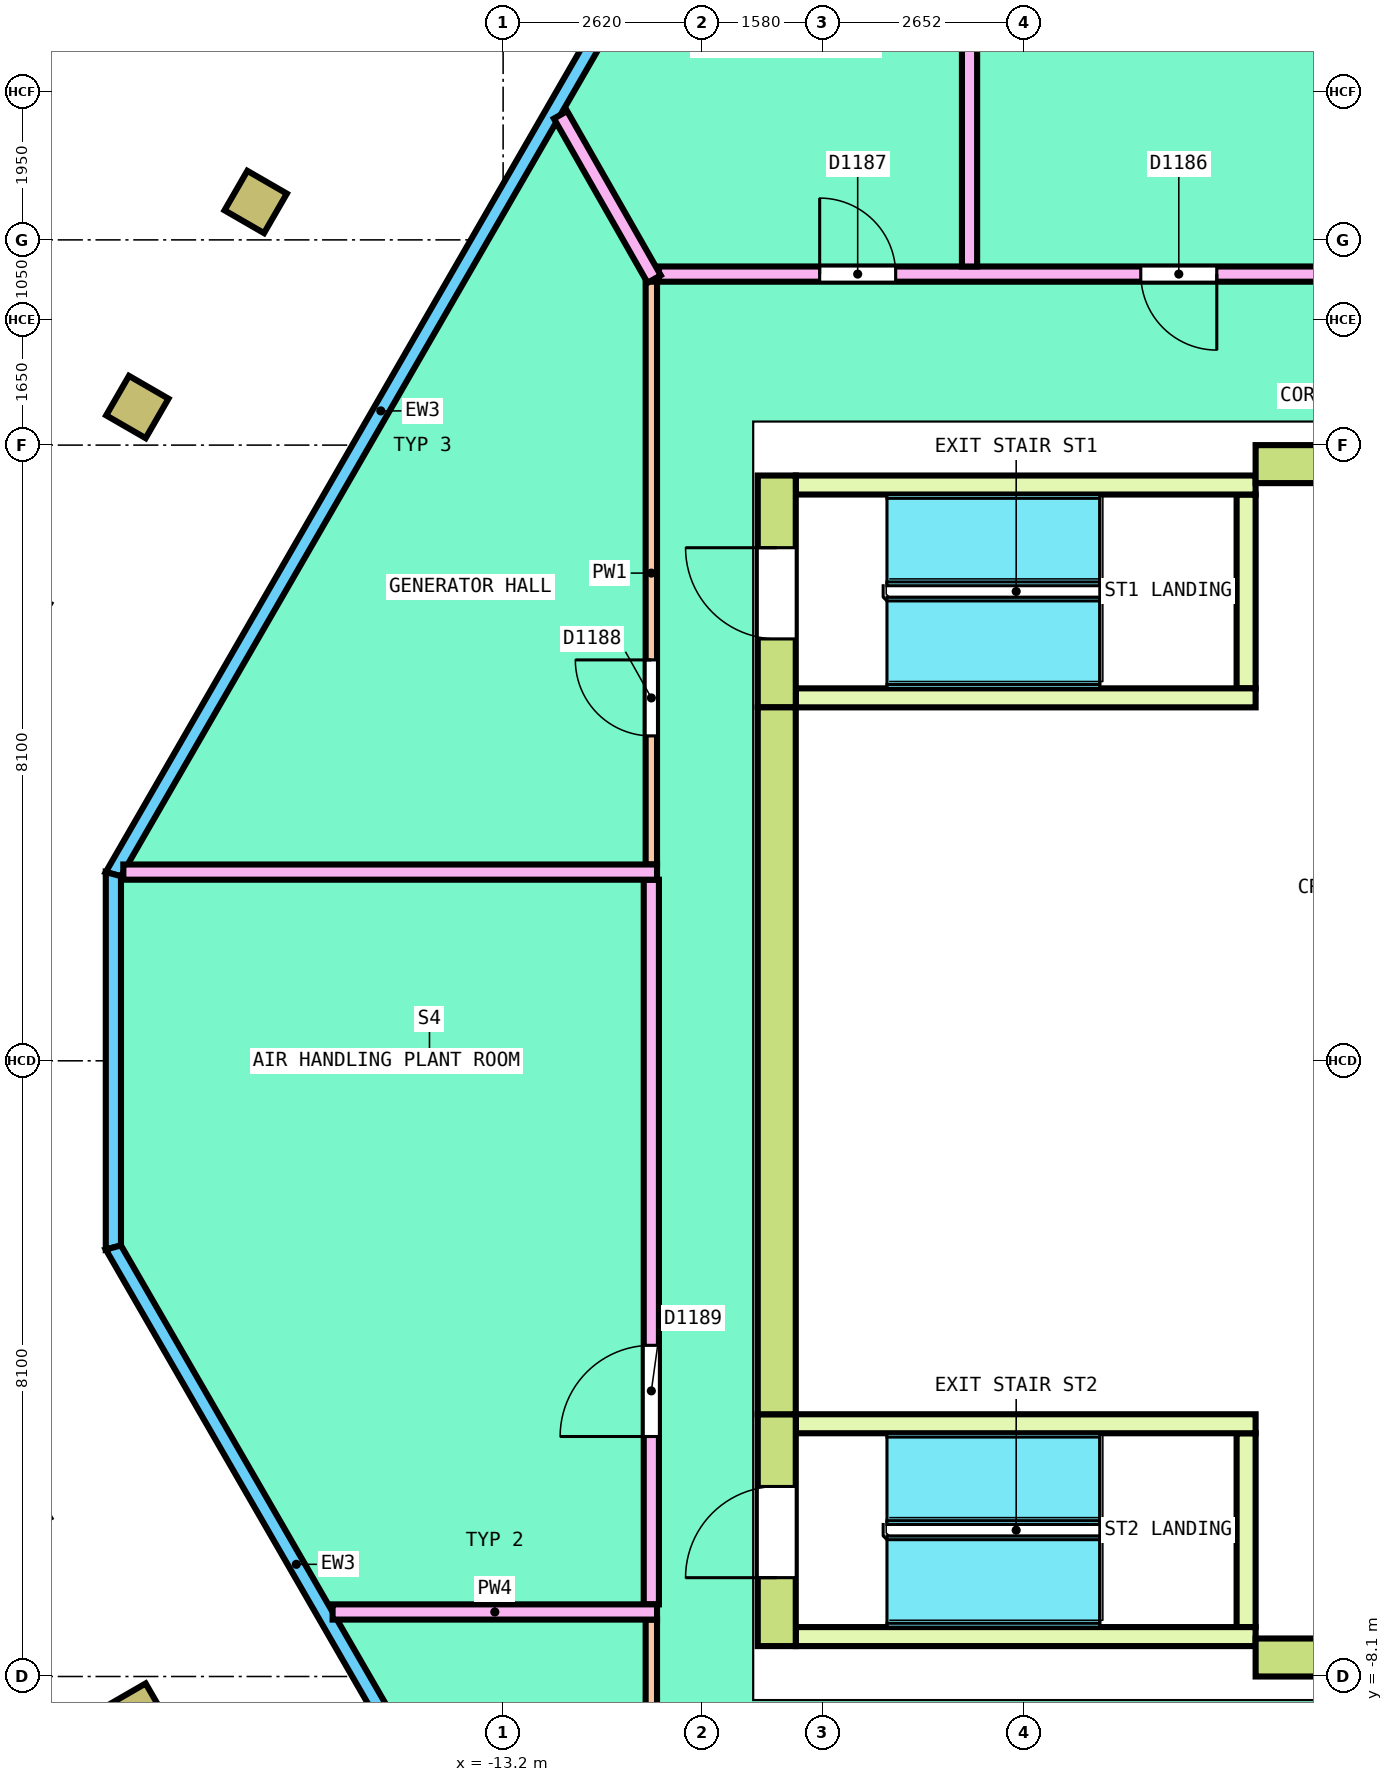
"""IFC4 building model, lengths in metres.
Left out: names, types, materials, properties, quantities, classifications, styles, units other than length and angle.
Written with IfcOpenShell. Run it as: python <this file> out.ifc"""

import sys

from ifc_helpers import new_model, si_unit, direction, frame, frame_2d, origin, origin_2d, place, context, subcontext, project, spatial, polyline, rectangle, hollow_rectangle, outline, extrude, element, fill, save


model = new_model("IFC4")
c1 = context("Model", 3, precision=1e-05, world=origin(), true_north=direction((0.0, 1.0)))
c2 = subcontext(c1, "Body", "Model", "MODEL_VIEW")
j1 = project(units=[si_unit("LENGTHUNIT", "METRE"), si_unit("PLANEANGLEUNIT", "RADIAN")], contexts=[c1])
p1 = place(None, origin())
s1 = spatial("IfcSite", under=j1, at=p1, CompositionType="ELEMENT")
p2 = place(p1, origin())
s2 = spatial("IfcBuilding", under=s1, at=p2, CompositionType="ELEMENT")
p3 = place(p2, frame((0.0, 0.0, 352.6)))
s3 = spatial("IfcBuildingStorey", under=s2, at=p3, CompositionType="ELEMENT", Elevation=352.6)
for number, where, z_axis, x_axis in (
    (1, (-16.455, 11.299, 0.0), (0.0, 0.0, 1.0), (-0.5, -0.866, 0.0)),
    (2, (-18.013, 8.601, 0.0), (0.0, 0.0, 1.0), (-0.5, -0.866, 0.0)),
    (3, (-18.013, -8.601, 0.0), (0.0, 0.0, 1.0), (0.5, -0.866, 0.0)),
):
    element("IfcColumn", number, at=place(p3, frame(where, z_axis=z_axis, x_axis=x_axis)), inside=s3, PredefinedType="COLUMN", context=c2, shape_type="SweptSolid", body=[
        extrude(hollow_rectangle(XDim=0.6, YDim=0.6, WallThickness=0.04, InnerFilletRadius=0.04, OuterFilletRadius=0.08, at=origin_2d()), origin(), (0.0, 0.0, 1.0), 4.0),
    ])
p4 = place(p3, frame((-11.291, 14.644, 0.0), z_axis=(0.0, 0.0, 1.0), x_axis=(-0.499991740577, -0.866030172312, 0.0)))
e4 = element("IfcWall", 4, at=p4, inside=s3, PredefinedType="SOLIDWALL", context=c2, shape_type="SweptSolid", body=[
    extrude(outline(polyline([(-0.027, -0.1), (14.101, -0.1), (14.047, 0.1), (0.027, 0.1), (-0.027, -0.1)])), origin(), (0.0, 0.0, 1.0), 3.8),
])
p5 = place(p3, frame((-18.327, 2.456, 0.0), z_axis=(0.0, 0.0, 1.0), x_axis=(0.0, -1.0, 0.0)))
e5 = element("IfcWall", 5, at=p5, inside=s3, PredefinedType="SOLIDWALL", context=c2, shape_type="SweptSolid", body=[
    extrude(outline(polyline([(-0.027, -0.1), (4.938, -0.1), (4.885, 0.1), (0.027, 0.1), (-0.027, -0.1)])), origin(), (0.0, 0.0, 1.0), 3.8),
])
p6 = place(p3, frame((-18.327, -2.456, 0.0), z_axis=(0.0, 0.0, 1.0), x_axis=(0.499993209709, -0.866029324125, 0.0)))
e6 = element("IfcWall", 6, at=p6, inside=s3, PredefinedType="SOLIDWALL", context=c2, shape_type="SweptSolid", body=[
    extrude(outline(polyline([(-0.027, -0.1), (9.627, -0.1), (9.627, 0.1), (0.027, 0.1), (-0.027, -0.1)])), origin(), (0.0, 0.0, 1.0), 3.8),
])
p7 = place(p3, frame((3.3, 7.85, 0.0), z_axis=(0.0, 0.0, 1.0), x_axis=(-1.0, 0.0, 0.0)))
e7 = element("IfcWall", 7, at=p7, inside=s3, PredefinedType="SHEAR", context=c2, shape_type="SweptSolid", body=[
    extrude(rectangle(XDim=6.6, YDim=0.5, at=frame_2d((3.3, 0.0))), origin(), (0.0, 0.0, 1.0), 3.8),
])
p8 = place(p3, frame((-9.6, 4.65, 0.0), z_axis=(0.0, 0.0, 1.0), x_axis=(0.0, -1.0, 0.0)))
e8 = element("IfcWall", 8, at=p8, inside=s3, PredefinedType="SHEAR", context=c2, shape_type="SweptSolid", body=[
    extrude(rectangle(XDim=9.3, YDim=0.5, at=frame_2d((4.65, 0.0))), origin(), (0.0, 0.0, 1.0), 3.8),
])
p9 = place(p3, frame((-3.3, -7.85, 0.0), z_axis=(0.0, 0.0, 1.0), x_axis=(1.0, 0.0, 0.0)))
e9 = element("IfcWall", 9, at=p9, inside=s3, PredefinedType="SHEAR", context=c2, shape_type="SweptSolid", body=[
    extrude(rectangle(XDim=12.9, YDim=0.5, at=frame_2d((6.45, 0.0))), origin(), (0.0, 0.0, 1.0), 3.8),
])
p10 = place(p9, frame((5.8, 0.0, 0.0)))
e10 = element("IfcOpeningElement", 10, at=p10, cuts=e9, PredefinedType="OPENING", context=c2, shape_type="SweptSolid", body=[
    extrude(rectangle(XDim=1.2, YDim=2.1, at=frame_2d((0.6, 1.05))), frame((0.0, 0.26, 0.0), z_axis=(0.0, -1.0, 0.0), x_axis=(1.0, 0.0, 0.0)), (0.0, 0.0, 1.0), 0.52),
])
p11 = place(p3, frame((-9.6, 4.65, 0.0), z_axis=(0.0, 0.0, 1.0), x_axis=(0.0, 1.0, 0.0)))
e11 = element("IfcWall", 11, at=p11, inside=s3, PredefinedType="SHEAR", context=c2, shape_type="SweptSolid", body=[
    extrude(rectangle(XDim=3.05, YDim=0.5, at=frame_2d((1.525, 0.0))), origin(), (0.0, 0.0, 1.0), 3.8),
])
p12 = place(p11, frame((0.9, 0.0, 0.0)))
e12 = element("IfcOpeningElement", 12, at=p12, cuts=e11, PredefinedType="OPENING", context=c2, shape_type="SweptSolid", body=[
    extrude(rectangle(XDim=1.2, YDim=2.1, at=frame_2d((0.6, 1.05))), frame((0.0, 0.26, 0.0), z_axis=(0.0, -1.0, 0.0), x_axis=(1.0, 0.0, 0.0)), (0.0, 0.0, 1.0), 0.52),
])
p13 = place(p3, frame((-3.425, 4.9, 0.0), z_axis=(0.0, 0.0, 1.0), x_axis=(0.0, 1.0, 0.0)))
e13 = element("IfcWall", 13, at=p13, inside=s3, PredefinedType="SOLIDWALL", context=c2, shape_type="SweptSolid", body=[
    extrude(rectangle(XDim=2.55, YDim=0.25, at=frame_2d((1.275, 0.0))), origin(), (0.0, 0.0, 1.0), 3.8),
])
for number, where, z_axis, x_axis in (
    (14, (-9.35, 4.775, 0.0), (0.0, 0.0, 1.0), (1.0, 0.0, 0.0)),
    (15, (-9.35, 7.575, 0.0), (0.0, 0.0, 1.0), (1.0, 0.0, 0.0)),
):
    element("IfcWall", number, at=place(p3, frame(where, z_axis=z_axis, x_axis=x_axis)), inside=s3, PredefinedType="SOLIDWALL", context=c2, shape_type="SweptSolid", body=[
        extrude(rectangle(XDim=6.05, YDim=0.25, at=frame_2d((3.025, 0.0))), origin(), (0.0, 0.0, 1.0), 3.8),
    ])
p14 = place(p3, frame((-9.6, -7.7, 0.0), z_axis=(0.0, 0.0, 1.0), x_axis=(0.0, 1.0, 0.0)))
e16 = element("IfcWall", 16, at=p14, inside=s3, PredefinedType="SHEAR", context=c2, shape_type="SweptSolid", body=[
    extrude(rectangle(XDim=3.05, YDim=0.5, at=frame_2d((1.525, 0.0))), origin(), (0.0, 0.0, 1.0), 3.8),
])
p15 = place(p14, frame((0.9, 0.0, 0.0)))
e17 = element("IfcOpeningElement", 17, at=p15, cuts=e16, PredefinedType="OPENING", context=c2, shape_type="SweptSolid", body=[
    extrude(rectangle(XDim=1.2, YDim=2.1, at=frame_2d((0.6, 1.05))), frame((0.0, 0.26, 0.0), z_axis=(0.0, -1.0, 0.0), x_axis=(1.0, 0.0, 0.0)), (0.0, 0.0, 1.0), 0.52),
])
p16 = place(p3, frame((-3.425, -7.45, 0.0), z_axis=(0.0, 0.0, 1.0), x_axis=(0.0, 1.0, 0.0)))
e18 = element("IfcWall", 18, at=p16, inside=s3, PredefinedType="SOLIDWALL", context=c2, shape_type="SweptSolid", body=[
    extrude(rectangle(XDim=2.55, YDim=0.25, at=frame_2d((1.275, 0.0))), origin(), (0.0, 0.0, 1.0), 3.8),
])
for number, where, z_axis, x_axis in (
    (19, (-9.35, -7.575, 0.0), (0.0, 0.0, 1.0), (1.0, 0.0, 0.0)),
    (20, (-9.35, -4.775, 0.0), (0.0, 0.0, 1.0), (1.0, 0.0, 0.0)),
):
    element("IfcWall", number, at=place(p3, frame(where, z_axis=z_axis, x_axis=x_axis)), inside=s3, PredefinedType="SOLIDWALL", context=c2, shape_type="SweptSolid", body=[
        extrude(rectangle(XDim=6.05, YDim=0.25, at=frame_2d((3.025, 0.0))), origin(), (0.0, 0.0, 1.0), 3.8),
    ])
p17 = place(p3, frame((-11.25, -10.275, 0.0), z_axis=(0.0, 0.0, 1.0), x_axis=(0.0, 1.0, 0.0)))
e21 = element("IfcWall", 21, at=p17, inside=s3, PredefinedType="PARTITIONING", context=c2, shape_type="SweptSolid", body=[
    extrude(rectangle(XDim=2.924, YDim=0.15, at=frame_2d((1.462, 0.0))), origin(), (0.0, 0.0, 1.0), 3.8),
])
p18 = place(p3, frame((-11.25, 2.583, 0.0), z_axis=(0.0, 0.0, 1.0), x_axis=(0.0, 1.0, 0.0)))
e22 = element("IfcWall", 22, at=p18, inside=s3, PredefinedType="PARTITIONING", context=c2, shape_type="SweptSolid", body=[
    extrude(rectangle(XDim=7.667, YDim=0.15, at=frame_2d((3.834, 0.0))), origin(), (0.0, 0.0, 1.0), 3.3),
])
p19 = place(p18, frame((1.691, 0.0, 0.0)))
e23 = element("IfcOpeningElement", 23, at=p19, cuts=e22, PredefinedType="OPENING", context=c2, shape_type="SweptSolid", body=[
    extrude(rectangle(XDim=1.0, YDim=2.1, at=frame_2d((0.5, 1.05))), frame((0.0, 0.085, 0.0), z_axis=(0.0, -1.0, 0.0), x_axis=(1.0, 0.0, 0.0)), (0.0, 0.0, 1.0), 0.17),
])
p20 = place(p3, frame((-11.15, 10.35, 0.0), z_axis=(0.0, 0.0, 1.0), x_axis=(1.0, 0.0, 0.0)))
e24 = element("IfcWall", 24, at=p20, inside=s3, PredefinedType="PARTITIONING", context=c2, shape_type="SweptSolid", body=[
    extrude(rectangle(XDim=15.722, YDim=0.2, at=frame_2d((7.861, 0.0))), origin(), (0.0, 0.0, 1.0), 3.3),
])
p21 = place(p20, frame((11.458, 0.0, 0.0)))
e25 = element("IfcOpeningElement", 25, at=p21, cuts=e24, PredefinedType="OPENING", context=c2, shape_type="SweptSolid", body=[
    extrude(rectangle(XDim=1.2, YDim=2.1, at=frame_2d((0.6, 1.05))), frame((0.0, 0.11, 0.0), z_axis=(0.0, -1.0, 0.0), x_axis=(1.0, 0.0, 0.0)), (0.0, 0.0, 1.0), 0.22),
])
p22 = place(p20, frame((6.339, 0.0, 0.0)))
e26 = element("IfcOpeningElement", 26, at=p22, cuts=e24, PredefinedType="OPENING", context=c2, shape_type="SweptSolid", body=[
    extrude(rectangle(XDim=1.0, YDim=2.1, at=frame_2d((0.5, 1.05))), frame((0.0, 0.11, 0.0), z_axis=(0.0, -1.0, 0.0), x_axis=(1.0, 0.0, 0.0)), (0.0, 0.0, 1.0), 0.22),
])
p23 = place(p20, frame((2.115, 0.0, 0.0)))
e27 = element("IfcOpeningElement", 27, at=p23, cuts=e24, PredefinedType="OPENING", context=c2, shape_type="SweptSolid", body=[
    extrude(rectangle(XDim=1.0, YDim=2.1, at=frame_2d((0.5, 1.05))), frame((0.0, 0.11, 0.0), z_axis=(0.0, -1.0, 0.0), x_axis=(1.0, 0.0, 0.0)), (0.0, 0.0, 1.0), 0.22),
])
p24 = place(p3, frame((-11.25, -7.151, 0.0), z_axis=(0.0, 0.0, 1.0), x_axis=(0.0, 1.0, 0.0)))
e28 = element("IfcWall", 28, at=p24, inside=s3, PredefinedType="PARTITIONING", context=c2, shape_type="SweptSolid", body=[
    extrude(rectangle(XDim=9.534, YDim=0.2, at=frame_2d((4.767, 0.0))), origin(), (0.0, 0.0, 1.0), 3.3),
])
p25 = place(p24, frame((2.208, 0.0, 0.0)))
e29 = element("IfcOpeningElement", 29, at=p25, cuts=e28, PredefinedType="OPENING", context=c2, shape_type="SweptSolid", body=[
    extrude(rectangle(XDim=1.2, YDim=2.1, at=frame_2d((0.6, 1.05))), frame((0.0, 0.11, 0.0), z_axis=(0.0, -1.0, 0.0), x_axis=(1.0, 0.0, 0.0)), (0.0, 0.0, 1.0), 0.22),
])
p26 = place(p3, frame((-7.064, 10.45, 0.0), z_axis=(0.0, 0.0, 1.0), x_axis=(0.0, 1.0, 0.0)))
e30 = element("IfcWall", 30, at=p26, inside=s3, PredefinedType="PARTITIONING", context=c2, shape_type="SweptSolid", body=[
    extrude(rectangle(XDim=6.519, YDim=0.2, at=frame_2d((3.26, 0.0))), origin(), (0.0, 0.0, 1.0), 3.3),
])
p27 = place(p3, frame((-12.445, 12.445, 0.0), z_axis=(0.0, 0.0, 1.0), x_axis=(0.495282327186, -0.868732073989, 0.0)))
e31 = element("IfcWall", 31, at=p27, inside=s3, PredefinedType="PARTITIONING", context=c2, shape_type="SweptSolid", body=[
    extrude(rectangle(XDim=2.487, YDim=0.2, at=frame_2d((1.243, 0.0))), origin(), (0.0, 0.0, 1.0), 3.3),
])
p28 = place(p3, frame((-18.197, 2.483, 0.0), z_axis=(0.0, 0.0, 1.0), x_axis=(1.0, 0.0, 0.0)))
e32 = element("IfcWall", 32, at=p28, inside=s3, PredefinedType="PARTITIONING", context=c2, shape_type="SweptSolid", body=[
    extrude(rectangle(XDim=7.021, YDim=0.2, at=frame_2d((3.511, 0.0))), origin(), (0.0, 0.0, 1.0), 3.3),
])
p29 = place(p3, frame((-15.443, -7.251, 0.0), z_axis=(0.0, 0.0, 1.0), x_axis=(1.0, 0.0, 0.0)))
e33 = element("IfcWall", 33, at=p29, inside=s3, PredefinedType="PARTITIONING", context=c2, shape_type="SweptSolid", body=[
    extrude(rectangle(XDim=4.268, YDim=0.2, at=frame_2d((2.134, 0.0))), origin(), (0.0, 0.0, 1.0), 3.3),
])
p30 = place(p12, origin())
e34 = element("IfcDoor", 34, at=p30, inside=s3, OperationType="SINGLE_SWING_LEFT", PredefinedType="DOOR", context=c2, shape_type="SweptSolid", body=[
    extrude(rectangle(XDim=1.2, YDim=2.1, at=frame_2d((0.6, 1.05))), frame((0.0, 0.2, 0.0), z_axis=(0.0, -1.0, 0.0), x_axis=(1.0, 0.0, 0.0)), (0.0, 0.0, 1.0), 0.4),
])
fill(e12, e34)
p31 = place(p15, origin())
e35 = element("IfcDoor", 35, at=p31, inside=s3, OperationType="SINGLE_SWING_RIGHT", PredefinedType="DOOR", context=c2, shape_type="SweptSolid", body=[
    extrude(rectangle(XDim=1.2, YDim=2.1, at=frame_2d((0.6, 1.05))), frame((0.0, 0.2, 0.0), z_axis=(0.0, -1.0, 0.0), x_axis=(1.0, 0.0, 0.0)), (0.0, 0.0, 1.0), 0.4),
])
fill(e17, e35)
p32 = place(p22, origin())
e36 = element("IfcDoor", 36, at=p32, inside=s3, OperationType="SINGLE_SWING_RIGHT", PredefinedType="DOOR", context=c2, shape_type="SweptSolid", body=[
    extrude(rectangle(XDim=1.0, YDim=2.1, at=frame_2d((0.5, 1.05))), frame((0.0, 0.025, 0.0), z_axis=(0.0, -1.0, 0.0), x_axis=(1.0, 0.0, 0.0)), (0.0, 0.0, 1.0), 0.05),
])
fill(e26, e36)
p33 = place(p23, origin())
e37 = element("IfcDoor", 37, at=p33, inside=s3, OperationType="SINGLE_SWING_RIGHT", PredefinedType="DOOR", context=c2, shape_type="SweptSolid", body=[
    extrude(rectangle(XDim=1.0, YDim=2.1, at=frame_2d((0.5, 1.05))), frame((0.0, 0.025, 0.0), z_axis=(0.0, -1.0, 0.0), x_axis=(1.0, 0.0, 0.0)), (0.0, 0.0, 1.0), 0.05),
])
fill(e27, e37)
p34 = place(p19, origin())
e38 = element("IfcDoor", 38, at=p34, inside=s3, OperationType="SINGLE_SWING_RIGHT", PredefinedType="DOOR", context=c2, shape_type="SweptSolid", body=[
    extrude(rectangle(XDim=1.0, YDim=2.1, at=frame_2d((0.5, 1.05))), frame((0.0, 0.025, 0.0), z_axis=(0.0, -1.0, 0.0), x_axis=(1.0, 0.0, 0.0)), (0.0, 0.0, 1.0), 0.05),
])
fill(e23, e38)
p35 = place(p25, origin())
e39 = element("IfcDoor", 39, at=p35, inside=s3, OperationType="DOUBLE_DOOR_SINGLE_SWING", PredefinedType="DOOR", context=c2, shape_type="SweptSolid", body=[
    extrude(rectangle(XDim=1.2, YDim=2.1, at=frame_2d((0.6, 1.05))), frame((0.0, 0.025, 0.0), z_axis=(0.0, -1.0, 0.0), x_axis=(1.0, 0.0, 0.0)), (0.0, 0.0, 1.0), 0.05),
])
fill(e29, e39)
save(model, sys.argv[1])
